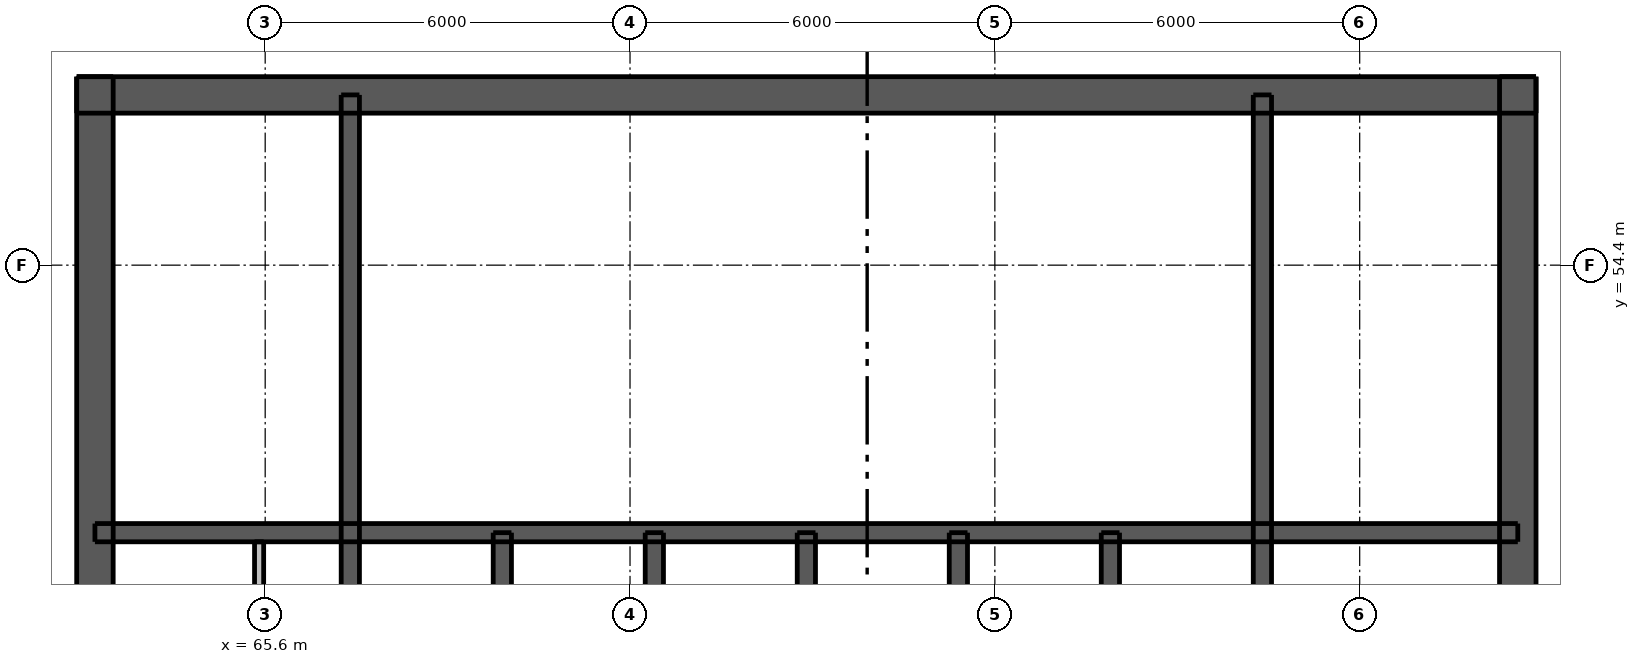
"""IFC4 building model, lengths in metres.
Left out: names, types, materials, properties, quantities, classifications, styles, units other than length and angle.
Written with IfcOpenShell. Run it as: python <this file> out.ifc"""

import sys

from ifc_helpers import new_model, si_unit, direction, frame, frame_2d, origin, place, context, subcontext, project, spatial, rectangle, extrude, element, fill, save


model = new_model("IFC4")
c1 = context("Model", 3, precision=1e-05, world=origin(), true_north=direction((0.0, 1.0)))
c2 = subcontext(c1, "Body", "Model", "MODEL_VIEW")
j1 = project(units=[si_unit("LENGTHUNIT", "METRE"), si_unit("PLANEANGLEUNIT", "RADIAN")], contexts=[c1])
p1 = place(None, origin())
s1 = spatial("IfcSite", under=j1, at=p1, CompositionType="ELEMENT")
p2 = place(p1, origin())
s2 = spatial("IfcBuilding", under=s1, at=p2, CompositionType="ELEMENT")
p3 = place(p2, frame((0.0, 0.0, 223.3)))
s3 = spatial("IfcBuildingStorey", under=s2, at=p3, CompositionType="ELEMENT", Elevation=223.3)
p4 = place(p3, frame((62.5, 57.2, 0.0), z_axis=(0.0, 0.0, 1.0), x_axis=(1.0, 0.0, 0.0)))
e1 = element("IfcWall", 1, at=p4, inside=s3, PredefinedType="SHEAR", context=c2, shape_type="SweptSolid", body=[
    extrude(rectangle(XDim=24.0, YDim=0.6, at=frame_2d((12.0, 0.0))), origin(), (0.0, 0.0, 1.0), 3.05),
])
p5 = place(p4, frame((20.975, 0.0, 0.0)))
e2 = element("IfcOpeningElement", 2, at=p5, cuts=e1, PredefinedType="OPENING", context=c2, shape_type="SweptSolid", body=[
    extrude(rectangle(XDim=1.1, YDim=2.1, at=frame_2d((0.55, 1.05))), frame((0.0, 0.31, 0.0), z_axis=(0.0, -1.0, 0.0), x_axis=(1.0, 0.0, 0.0)), (0.0, 0.0, 1.0), 0.62),
])
p6 = place(p4, frame((1.925, 0.0, 0.0)))
e3 = element("IfcOpeningElement", 3, at=p6, cuts=e1, PredefinedType="OPENING", context=c2, shape_type="SweptSolid", body=[
    extrude(rectangle(XDim=1.1, YDim=2.1, at=frame_2d((0.55, 1.05))), frame((0.0, 0.31, 0.0), z_axis=(0.0, -1.0, 0.0), x_axis=(1.0, 0.0, 0.0)), (0.0, 0.0, 1.0), 0.62),
])
p7 = place(p4, frame((11.55, 0.0, 0.0)))
e4 = element("IfcOpeningElement", 4, at=p7, cuts=e1, PredefinedType="OPENING", context=c2, shape_type="SweptSolid", body=[
    extrude(rectangle(XDim=0.9, YDim=2.1, at=frame_2d((0.45, 1.05))), frame((0.0, 0.31, 0.0), z_axis=(0.0, -1.0, 0.0), x_axis=(1.0, 0.0, 0.0)), (0.0, 0.0, 1.0), 0.62),
])
p8 = place(p3, frame((62.8, 33.5, 0.0), z_axis=(0.0, 0.0, 1.0), x_axis=(0.0, 1.0, 0.0)))
e5 = element("IfcWall", 5, at=p8, inside=s3, PredefinedType="SHEAR", context=c2, shape_type="SweptSolid", body=[
    extrude(rectangle(XDim=24.0, YDim=0.6, at=frame_2d((12.0, 0.0))), origin(), (0.0, 0.0, 1.0), 3.05),
])
p9 = place(p8, frame((11.2, 0.0, 0.0)))
e6 = element("IfcOpeningElement", 6, at=p9, cuts=e5, PredefinedType="OPENING", context=c2, shape_type="SweptSolid", body=[
    extrude(rectangle(XDim=1.6, YDim=2.1, at=frame_2d((0.8, 1.05))), frame((0.0, 0.31, 0.0), z_axis=(0.0, -1.0, 0.0), x_axis=(1.0, 0.0, 0.0)), (0.0, 0.0, 1.0), 0.62),
])
p10 = place(p3, frame((86.2, 33.5, 0.0), z_axis=(0.0, 0.0, 1.0), x_axis=(0.0, 1.0, 0.0)))
e7 = element("IfcWall", 7, at=p10, inside=s3, PredefinedType="SHEAR", context=c2, shape_type="SweptSolid", body=[
    extrude(rectangle(XDim=24.0, YDim=0.6, at=frame_2d((12.0, 0.0))), origin(), (0.0, 0.0, 1.0), 3.05),
])
p11 = place(p10, frame((11.2, 0.0, 0.0)))
e8 = element("IfcOpeningElement", 8, at=p11, cuts=e7, PredefinedType="OPENING", context=c2, shape_type="SweptSolid", body=[
    extrude(rectangle(XDim=1.6, YDim=2.1, at=frame_2d((0.8, 1.05))), frame((0.0, 0.31, 0.0), z_axis=(0.0, -1.0, 0.0), x_axis=(1.0, 0.0, 0.0)), (0.0, 0.0, 1.0), 0.62),
])
p12 = place(p3, frame((62.8, 50.0, 0.0), z_axis=(0.0, 0.0, 1.0), x_axis=(1.0, 0.0, 0.0)))
e9 = element("IfcWall", 9, at=p12, inside=s3, PredefinedType="SHEAR", context=c2, shape_type="SweptSolid", body=[
    extrude(rectangle(XDim=23.4, YDim=0.3, at=frame_2d((11.7, 0.0))), origin(), (0.0, 0.0, 1.0), 3.05),
])
for number, where, z_axis, x_axis in (
    (10, (67.0, 47.1, 0.0), (0.0, 0.0, 1.0), (0.0, 1.0, 0.0)),
    (11, (82.0, 47.1, 0.0), (0.0, 0.0, 1.0), (0.0, 1.0, 0.0)),
):
    element("IfcWall", number, at=place(p3, frame(where, z_axis=z_axis, x_axis=x_axis)), inside=s3, PredefinedType="SHEAR", context=c2, shape_type="SweptSolid", body=[
        extrude(rectangle(XDim=10.1, YDim=0.3, at=frame_2d((5.05, 0.0))), origin(), (0.0, 0.0, 1.0), 3.05),
    ])
for number, where, z_axis, x_axis in (
    (12, (69.5, 47.1, 0.0), (0.0, 0.0, 1.0), (0.0, 1.0, 0.0)),
    (13, (72.0, 47.1, 0.0), (0.0, 0.0, 1.0), (0.0, 1.0, 0.0)),
    (14, (74.5, 47.1, 0.0), (0.0, 0.0, 1.0), (0.0, 1.0, 0.0)),
    (15, (77.0, 47.1, 0.0), (0.0, 0.0, 1.0), (0.0, 1.0, 0.0)),
    (16, (79.5, 47.1, 0.0), (0.0, 0.0, 1.0), (0.0, 1.0, 0.0)),
):
    element("IfcWall", number, at=place(p3, frame(where, z_axis=z_axis, x_axis=x_axis)), inside=s3, PredefinedType="SHEAR", context=c2, shape_type="SweptSolid", body=[
        extrude(rectangle(XDim=2.9, YDim=0.3, at=frame_2d((1.45, 0.0))), origin(), (0.0, 0.0, 1.0), 3.05),
    ])
p13 = place(p3, frame((65.5, 47.25, 0.0), z_axis=(0.0, 0.0, 1.0), x_axis=(0.0, 1.0, 0.0)))
e17 = element("IfcWall", 17, at=p13, inside=s3, PredefinedType="PLUMBINGWALL", context=c2, shape_type="SweptSolid", body=[
    extrude(rectangle(XDim=2.6, YDim=0.15, at=frame_2d((1.3, 0.0))), origin(), (0.0, 0.0, 1.0), 3.05),
])
p14 = place(p5, origin())
e18 = element("IfcDoor", 18, at=p14, inside=s3, OperationType="SINGLE_SWING_RIGHT", PredefinedType="DOOR", context=c2, shape_type="SweptSolid", body=[
    extrude(rectangle(XDim=1.1, YDim=2.1, at=frame_2d((0.55, 1.05))), frame((0.0, -0.237, 0.0), z_axis=(0.0, -1.0, 0.0), x_axis=(1.0, 0.0, 0.0)), (0.0, 0.0, 1.0), 0.05),
])
fill(e2, e18)
p15 = place(p6, origin())
e19 = element("IfcDoor", 19, at=p15, inside=s3, OperationType="SINGLE_SWING_LEFT", PredefinedType="DOOR", context=c2, shape_type="SweptSolid", body=[
    extrude(rectangle(XDim=1.1, YDim=2.1, at=frame_2d((0.55, 1.05))), frame((0.0, -0.237, 0.0), z_axis=(0.0, -1.0, 0.0), x_axis=(1.0, 0.0, 0.0)), (0.0, 0.0, 1.0), 0.05),
])
fill(e3, e19)
p16 = place(p7, origin())
e20 = element("IfcDoor", 20, at=p16, inside=s3, OperationType="SINGLE_SWING_RIGHT", PredefinedType="DOOR", context=c2, shape_type="SweptSolid", body=[
    extrude(rectangle(XDim=0.9, YDim=2.1, at=frame_2d((0.45, 1.05))), frame((0.0, -0.237, 0.0), z_axis=(0.0, -1.0, 0.0), x_axis=(1.0, 0.0, 0.0)), (0.0, 0.0, 1.0), 0.05),
])
fill(e4, e20)
save(model, sys.argv[1])
